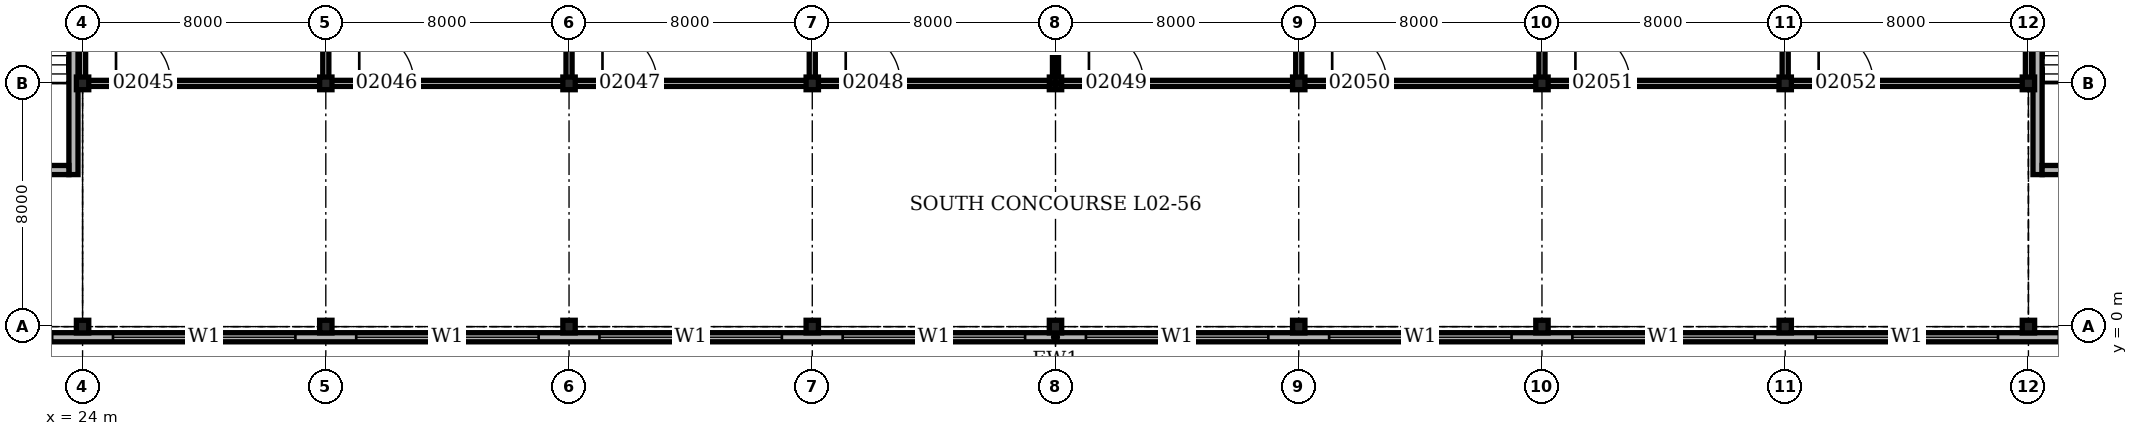
"""IFC4 building model, lengths in metres.
Left out: names, types, materials, properties, quantities, classifications, styles, units other than length and angle.
Written with IfcOpenShell. Run it as: python <this file> out.ifc"""

import sys

from ifc_helpers import new_model, si_unit, direction, frame, frame_2d, origin, origin_2d, place, context, subcontext, project, spatial, rectangle, i_section, extrude, element, fill, save


model = new_model("IFC4")
c1 = context("Model", 3, precision=1e-05, world=origin(), true_north=direction((0.0, 1.0)))
c2 = subcontext(c1, "Body", "Model", "MODEL_VIEW")
j1 = project(units=[si_unit("LENGTHUNIT", "METRE"), si_unit("PLANEANGLEUNIT", "RADIAN")], contexts=[c1])
p1 = place(None, origin())
s1 = spatial("IfcSite", under=j1, at=p1, CompositionType="ELEMENT")
p2 = place(p1, origin())
s2 = spatial("IfcBuilding", under=s1, at=p2, CompositionType="ELEMENT")
p3 = place(p2, frame((0.0, 0.0, 9.9)))
s3 = spatial("IfcBuildingStorey", under=s2, at=p3, CompositionType="ELEMENT", Elevation=9.9)
for number, where, z_axis, x_axis in (
    (1, (24.0, 0.0, 0.0), (0.0, 0.0, 1.0), (1.0, 0.0, 0.0)),
    (2, (24.0, 8.0, 0.0), (0.0, 0.0, 1.0), (1.0, 0.0, 0.0)),
    (3, (32.0, 0.0, 0.0), (0.0, 0.0, 1.0), (1.0, 0.0, 0.0)),
    (4, (32.0, 8.0, 0.0), (0.0, 0.0, 1.0), (1.0, 0.0, 0.0)),
    (5, (40.0, 0.0, 0.0), (0.0, 0.0, 1.0), (1.0, 0.0, 0.0)),
    (6, (40.0, 8.0, 0.0), (0.0, 0.0, 1.0), (1.0, 0.0, 0.0)),
    (7, (48.0, 0.0, 0.0), (0.0, 0.0, 1.0), (1.0, 0.0, 0.0)),
    (8, (48.0, 8.0, 0.0), (0.0, 0.0, 1.0), (1.0, 0.0, 0.0)),
    (9, (56.0, 0.0, 0.0), (0.0, 0.0, 1.0), (1.0, 0.0, 0.0)),
    (10, (56.0, 8.0, 0.0), (0.0, 0.0, 1.0), (1.0, 0.0, 0.0)),
    (11, (64.0, 0.0, 0.0), (0.0, 0.0, 1.0), (1.0, 0.0, 0.0)),
    (12, (64.0, 8.0, 0.0), (0.0, 0.0, 1.0), (1.0, 0.0, 0.0)),
    (13, (72.0, 0.0, 0.0), (0.0, 0.0, 1.0), (1.0, 0.0, 0.0)),
    (14, (72.0, 8.0, 0.0), (0.0, 0.0, 1.0), (1.0, 0.0, 0.0)),
    (15, (80.0, 0.0, 0.0), (0.0, 0.0, 1.0), (1.0, 0.0, 0.0)),
    (16, (80.0, 8.0, 0.0), (0.0, 0.0, 1.0), (1.0, 0.0, 0.0)),
    (17, (88.0, 0.0, 0.0), (0.0, 0.0, 1.0), (1.0, 0.0, 0.0)),
    (18, (88.0, 8.0, 0.0), (0.0, 0.0, 1.0), (1.0, 0.0, 0.0)),
):
    element("IfcColumn", number, at=place(p3, frame(where, z_axis=z_axis, x_axis=x_axis)), inside=s3, PredefinedType="COLUMN", context=c2, shape_type="SweptSolid", body=[
        extrude(i_section(OverallWidth=0.406, OverallDepth=0.417, WebThickness=0.03, FlangeThickness=0.048, at=origin_2d()), origin(), (0.0, 0.0, 1.0), 5.0),
    ])
p4 = place(p3, frame((-0.35, -0.35, 0.0), z_axis=(0.0, 0.0, 1.0), x_axis=(1.0, 0.0, 0.0)))
e19 = element("IfcWall", 19, at=p4, inside=s3, PredefinedType="SOLIDWALL", context=c2, shape_type="SweptSolid", body=[
    extrude(rectangle(XDim=112.7, YDim=0.3, at=frame_2d((56.35, 0.0))), origin(), (0.0, 0.0, 1.0), 5.0),
])
p5 = place(p4, frame((1.35, 0.0, 1.0)))
e20 = element("IfcOpeningElement", 20, at=p5, cuts=e19, PredefinedType="OPENING", context=c2, shape_type="SweptSolid", body=[
    extrude(rectangle(XDim=6.0, YDim=1.5, at=frame_2d((3.0, 0.75))), frame((0.0, 0.16, 0.0), z_axis=(0.0, -1.0, 0.0), x_axis=(1.0, 0.0, 0.0)), (0.0, 0.0, 1.0), 0.32),
])
p6 = place(p4, frame((9.35, 0.0, 1.0)))
e21 = element("IfcOpeningElement", 21, at=p6, cuts=e19, PredefinedType="OPENING", context=c2, shape_type="SweptSolid", body=[
    extrude(rectangle(XDim=6.0, YDim=1.5, at=frame_2d((3.0, 0.75))), frame((0.0, 0.16, 0.0), z_axis=(0.0, -1.0, 0.0), x_axis=(1.0, 0.0, 0.0)), (0.0, 0.0, 1.0), 0.32),
])
p7 = place(p4, frame((17.35, 0.0, 1.0)))
e22 = element("IfcOpeningElement", 22, at=p7, cuts=e19, PredefinedType="OPENING", context=c2, shape_type="SweptSolid", body=[
    extrude(rectangle(XDim=6.0, YDim=1.5, at=frame_2d((3.0, 0.75))), frame((0.0, 0.16, 0.0), z_axis=(0.0, -1.0, 0.0), x_axis=(1.0, 0.0, 0.0)), (0.0, 0.0, 1.0), 0.32),
])
p8 = place(p4, frame((25.35, 0.0, 1.0)))
e23 = element("IfcOpeningElement", 23, at=p8, cuts=e19, PredefinedType="OPENING", context=c2, shape_type="SweptSolid", body=[
    extrude(rectangle(XDim=6.0, YDim=1.5, at=frame_2d((3.0, 0.75))), frame((0.0, 0.16, 0.0), z_axis=(0.0, -1.0, 0.0), x_axis=(1.0, 0.0, 0.0)), (0.0, 0.0, 1.0), 0.32),
])
p9 = place(p4, frame((33.35, 0.0, 1.0)))
e24 = element("IfcOpeningElement", 24, at=p9, cuts=e19, PredefinedType="OPENING", context=c2, shape_type="SweptSolid", body=[
    extrude(rectangle(XDim=6.0, YDim=1.5, at=frame_2d((3.0, 0.75))), frame((0.0, 0.16, 0.0), z_axis=(0.0, -1.0, 0.0), x_axis=(1.0, 0.0, 0.0)), (0.0, 0.0, 1.0), 0.32),
])
p10 = place(p4, frame((41.35, 0.0, 1.0)))
e25 = element("IfcOpeningElement", 25, at=p10, cuts=e19, PredefinedType="OPENING", context=c2, shape_type="SweptSolid", body=[
    extrude(rectangle(XDim=6.0, YDim=1.5, at=frame_2d((3.0, 0.75))), frame((0.0, 0.16, 0.0), z_axis=(0.0, -1.0, 0.0), x_axis=(1.0, 0.0, 0.0)), (0.0, 0.0, 1.0), 0.32),
])
p11 = place(p4, frame((49.35, 0.0, 1.0)))
e26 = element("IfcOpeningElement", 26, at=p11, cuts=e19, PredefinedType="OPENING", context=c2, shape_type="SweptSolid", body=[
    extrude(rectangle(XDim=6.0, YDim=1.5, at=frame_2d((3.0, 0.75))), frame((0.0, 0.16, 0.0), z_axis=(0.0, -1.0, 0.0), x_axis=(1.0, 0.0, 0.0)), (0.0, 0.0, 1.0), 0.32),
])
p12 = place(p4, frame((57.35, 0.0, 1.0)))
e27 = element("IfcOpeningElement", 27, at=p12, cuts=e19, PredefinedType="OPENING", context=c2, shape_type="SweptSolid", body=[
    extrude(rectangle(XDim=6.0, YDim=1.5, at=frame_2d((3.0, 0.75))), frame((0.0, 0.16, 0.0), z_axis=(0.0, -1.0, 0.0), x_axis=(1.0, 0.0, 0.0)), (0.0, 0.0, 1.0), 0.32),
])
p13 = place(p4, frame((65.35, 0.0, 1.0)))
e28 = element("IfcOpeningElement", 28, at=p13, cuts=e19, PredefinedType="OPENING", context=c2, shape_type="SweptSolid", body=[
    extrude(rectangle(XDim=6.0, YDim=1.5, at=frame_2d((3.0, 0.75))), frame((0.0, 0.16, 0.0), z_axis=(0.0, -1.0, 0.0), x_axis=(1.0, 0.0, 0.0)), (0.0, 0.0, 1.0), 0.32),
])
p14 = place(p4, frame((73.35, 0.0, 1.0)))
e29 = element("IfcOpeningElement", 29, at=p14, cuts=e19, PredefinedType="OPENING", context=c2, shape_type="SweptSolid", body=[
    extrude(rectangle(XDim=6.0, YDim=1.5, at=frame_2d((3.0, 0.75))), frame((0.0, 0.16, 0.0), z_axis=(0.0, -1.0, 0.0), x_axis=(1.0, 0.0, 0.0)), (0.0, 0.0, 1.0), 0.32),
])
p15 = place(p4, frame((81.35, 0.0, 1.0)))
e30 = element("IfcOpeningElement", 30, at=p15, cuts=e19, PredefinedType="OPENING", context=c2, shape_type="SweptSolid", body=[
    extrude(rectangle(XDim=6.0, YDim=1.5, at=frame_2d((3.0, 0.75))), frame((0.0, 0.16, 0.0), z_axis=(0.0, -1.0, 0.0), x_axis=(1.0, 0.0, 0.0)), (0.0, 0.0, 1.0), 0.32),
])
p16 = place(p4, frame((89.35, 0.0, 1.0)))
e31 = element("IfcOpeningElement", 31, at=p16, cuts=e19, PredefinedType="OPENING", context=c2, shape_type="SweptSolid", body=[
    extrude(rectangle(XDim=6.0, YDim=1.5, at=frame_2d((3.0, 0.75))), frame((0.0, 0.16, 0.0), z_axis=(0.0, -1.0, 0.0), x_axis=(1.0, 0.0, 0.0)), (0.0, 0.0, 1.0), 0.32),
])
p17 = place(p4, frame((97.35, 0.0, 1.0)))
e32 = element("IfcOpeningElement", 32, at=p17, cuts=e19, PredefinedType="OPENING", context=c2, shape_type="SweptSolid", body=[
    extrude(rectangle(XDim=6.0, YDim=1.5, at=frame_2d((3.0, 0.75))), frame((0.0, 0.16, 0.0), z_axis=(0.0, -1.0, 0.0), x_axis=(1.0, 0.0, 0.0)), (0.0, 0.0, 1.0), 0.32),
])
p18 = place(p4, frame((105.35, 0.0, 1.0)))
e33 = element("IfcOpeningElement", 33, at=p18, cuts=e19, PredefinedType="OPENING", context=c2, shape_type="SweptSolid", body=[
    extrude(rectangle(XDim=6.0, YDim=1.5, at=frame_2d((3.0, 0.75))), frame((0.0, 0.16, 0.0), z_axis=(0.0, -1.0, 0.0), x_axis=(1.0, 0.0, 0.0)), (0.0, 0.0, 1.0), 0.32),
])
p19 = place(p3, frame((23.7, 5.0, 0.0), z_axis=(0.0, 0.0, 1.0), x_axis=(0.0, 1.0, 0.0)))
e34 = element("IfcWall", 34, at=p19, inside=s3, PredefinedType="SOLIDWALL", context=c2, shape_type="SweptSolid", body=[
    extrude(rectangle(XDim=10.85, YDim=0.3, at=frame_2d((5.425, 0.0))), origin(), (0.0, 0.0, 1.0), 4.8),
])
p20 = place(p3, frame((16.3, 5.15, 0.0), z_axis=(0.0, 0.0, 1.0), x_axis=(1.0, 0.0, 0.0)))
e35 = element("IfcWall", 35, at=p20, inside=s3, PredefinedType="SOLIDWALL", context=c2, shape_type="SweptSolid", body=[
    extrude(rectangle(XDim=7.25, YDim=0.3, at=frame_2d((3.625, 0.0))), origin(), (0.0, 0.0, 1.0), 4.8),
])
p21 = place(p20, frame((2.725, 0.0, 0.0)))
e36 = element("IfcOpeningElement", 36, at=p21, cuts=e35, PredefinedType="OPENING", context=c2, shape_type="SweptSolid", body=[
    extrude(rectangle(XDim=1.8, YDim=2.1, at=frame_2d((0.9, 1.05))), frame((0.0, 0.16, 0.0), z_axis=(0.0, -1.0, 0.0), x_axis=(1.0, 0.0, 0.0)), (0.0, 0.0, 1.0), 0.32),
])
p22 = place(p3, frame((88.3, 5.0, 0.0), z_axis=(0.0, 0.0, 1.0), x_axis=(0.0, 1.0, 0.0)))
e37 = element("IfcWall", 37, at=p22, inside=s3, PredefinedType="SOLIDWALL", context=c2, shape_type="SweptSolid", body=[
    extrude(rectangle(XDim=10.85, YDim=0.3, at=frame_2d((5.425, 0.0))), origin(), (0.0, 0.0, 1.0), 4.8),
])
p23 = place(p3, frame((88.45, 5.15, 0.0), z_axis=(0.0, 0.0, 1.0), x_axis=(1.0, 0.0, 0.0)))
e38 = element("IfcWall", 38, at=p23, inside=s3, PredefinedType="SOLIDWALL", context=c2, shape_type="SweptSolid", body=[
    extrude(rectangle(XDim=7.25, YDim=0.3, at=frame_2d((3.625, 0.0))), origin(), (0.0, 0.0, 1.0), 4.8),
])
p24 = place(p23, frame((2.725, 0.0, 0.0)))
e39 = element("IfcOpeningElement", 39, at=p24, cuts=e38, PredefinedType="OPENING", context=c2, shape_type="SweptSolid", body=[
    extrude(rectangle(XDim=1.8, YDim=2.1, at=frame_2d((0.9, 1.05))), frame((0.0, 0.16, 0.0), z_axis=(0.0, -1.0, 0.0), x_axis=(1.0, 0.0, 0.0)), (0.0, 0.0, 1.0), 0.32),
])
p25 = place(p3, frame((24.1, 8.0, 0.0), z_axis=(0.0, 0.0, 1.0), x_axis=(1.0, 0.0, 0.0)))
e40 = element("IfcWall", 40, at=p25, inside=s3, PredefinedType="PARTITIONING", context=c2, shape_type="SweptSolid", body=[
    extrude(rectangle(XDim=63.8, YDim=0.2, at=frame_2d((31.9, 0.0))), origin(), (0.0, 0.0, 1.0), 4.028),
])
p26 = place(p25, frame((1.0, 0.0, 0.0)))
e41 = element("IfcOpeningElement", 41, at=p26, cuts=e40, PredefinedType="OPENING", context=c2, shape_type="SweptSolid", body=[
    extrude(rectangle(XDim=1.8, YDim=2.4, at=frame_2d((0.9, 1.2))), frame((0.0, 0.11, 0.0), z_axis=(0.0, -1.0, 0.0), x_axis=(1.0, 0.0, 0.0)), (0.0, 0.0, 1.0), 0.22),
])
p27 = place(p25, frame((9.0, 0.0, 0.0)))
e42 = element("IfcOpeningElement", 42, at=p27, cuts=e40, PredefinedType="OPENING", context=c2, shape_type="SweptSolid", body=[
    extrude(rectangle(XDim=1.8, YDim=2.4, at=frame_2d((0.9, 1.2))), frame((0.0, 0.11, 0.0), z_axis=(0.0, -1.0, 0.0), x_axis=(1.0, 0.0, 0.0)), (0.0, 0.0, 1.0), 0.22),
])
p28 = place(p25, frame((17.0, 0.0, 0.0)))
e43 = element("IfcOpeningElement", 43, at=p28, cuts=e40, PredefinedType="OPENING", context=c2, shape_type="SweptSolid", body=[
    extrude(rectangle(XDim=1.8, YDim=2.4, at=frame_2d((0.9, 1.2))), frame((0.0, 0.11, 0.0), z_axis=(0.0, -1.0, 0.0), x_axis=(1.0, 0.0, 0.0)), (0.0, 0.0, 1.0), 0.22),
])
p29 = place(p25, frame((25.0, 0.0, 0.0)))
e44 = element("IfcOpeningElement", 44, at=p29, cuts=e40, PredefinedType="OPENING", context=c2, shape_type="SweptSolid", body=[
    extrude(rectangle(XDim=1.8, YDim=2.4, at=frame_2d((0.9, 1.2))), frame((0.0, 0.11, 0.0), z_axis=(0.0, -1.0, 0.0), x_axis=(1.0, 0.0, 0.0)), (0.0, 0.0, 1.0), 0.22),
])
p30 = place(p25, frame((33.0, 0.0, 0.0)))
e45 = element("IfcOpeningElement", 45, at=p30, cuts=e40, PredefinedType="OPENING", context=c2, shape_type="SweptSolid", body=[
    extrude(rectangle(XDim=1.8, YDim=2.4, at=frame_2d((0.9, 1.2))), frame((0.0, 0.11, 0.0), z_axis=(0.0, -1.0, 0.0), x_axis=(1.0, 0.0, 0.0)), (0.0, 0.0, 1.0), 0.22),
])
p31 = place(p25, frame((41.0, 0.0, 0.0)))
e46 = element("IfcOpeningElement", 46, at=p31, cuts=e40, PredefinedType="OPENING", context=c2, shape_type="SweptSolid", body=[
    extrude(rectangle(XDim=1.8, YDim=2.4, at=frame_2d((0.9, 1.2))), frame((0.0, 0.11, 0.0), z_axis=(0.0, -1.0, 0.0), x_axis=(1.0, 0.0, 0.0)), (0.0, 0.0, 1.0), 0.22),
])
p32 = place(p25, frame((49.0, 0.0, 0.0)))
e47 = element("IfcOpeningElement", 47, at=p32, cuts=e40, PredefinedType="OPENING", context=c2, shape_type="SweptSolid", body=[
    extrude(rectangle(XDim=1.8, YDim=2.4, at=frame_2d((0.9, 1.2))), frame((0.0, 0.11, 0.0), z_axis=(0.0, -1.0, 0.0), x_axis=(1.0, 0.0, 0.0)), (0.0, 0.0, 1.0), 0.22),
])
p33 = place(p25, frame((57.0, 0.0, 0.0)))
e48 = element("IfcOpeningElement", 48, at=p33, cuts=e40, PredefinedType="OPENING", context=c2, shape_type="SweptSolid", body=[
    extrude(rectangle(XDim=1.8, YDim=2.4, at=frame_2d((0.9, 1.2))), frame((0.0, 0.11, 0.0), z_axis=(0.0, -1.0, 0.0), x_axis=(1.0, 0.0, 0.0)), (0.0, 0.0, 1.0), 0.22),
])
p34 = place(p3, frame((24.0, 8.1, 0.0), z_axis=(0.0, 0.0, 1.0), x_axis=(0.0, 1.0, 0.0)))
e49 = element("IfcWall", 49, at=p34, inside=s3, PredefinedType="PARTITIONING", context=c2, shape_type="SweptSolid", body=[
    extrude(rectangle(XDim=55.8, YDim=0.2, at=frame_2d((27.9, 0.0))), origin(), (0.0, 0.0, 1.0), 4.028),
])
for number, where, z_axis, x_axis in (
    (50, (32.0, 8.1, 0.0), (0.0, 0.0, 1.0), (0.0, 1.0, 0.0)),
    (51, (40.0, 8.1, 0.0), (0.0, 0.0, 1.0), (0.0, 1.0, 0.0)),
    (52, (48.0, 8.1, 0.0), (0.0, 0.0, 1.0), (0.0, 1.0, 0.0)),
    (53, (56.0, 8.1, 0.0), (0.0, 0.0, 1.0), (0.0, 1.0, 0.0)),
    (54, (64.0, 8.1, 0.0), (0.0, 0.0, 1.0), (0.0, 1.0, 0.0)),
    (55, (72.0, 8.1, 0.0), (0.0, 0.0, 1.0), (0.0, 1.0, 0.0)),
    (56, (80.0, 8.1, 0.0), (0.0, 0.0, 1.0), (0.0, 1.0, 0.0)),
):
    element("IfcWall", number, at=place(p3, frame(where, z_axis=z_axis, x_axis=x_axis)), inside=s3, PredefinedType="PARTITIONING", context=c2, shape_type="SweptSolid", body=[
        extrude(rectangle(XDim=7.8, YDim=0.2, at=frame_2d((3.9, 0.0))), origin(), (0.0, 0.0, 1.0), 4.072),
    ])
p35 = place(p3, frame((88.0, 8.1, 0.0), z_axis=(0.0, 0.0, 1.0), x_axis=(0.0, 1.0, 0.0)))
e57 = element("IfcWall", 57, at=p35, inside=s3, PredefinedType="PARTITIONING", context=c2, shape_type="SweptSolid", body=[
    extrude(rectangle(XDim=55.8, YDim=0.2, at=frame_2d((27.9, 0.0))), origin(), (0.0, 0.0, 1.0), 4.028),
])
p36 = place(p8, origin())
e58 = element("IfcWindow", 58, at=p36, inside=s3, PartitioningType="SINGLE_PANEL", PredefinedType="WINDOW", context=c2, shape_type="SweptSolid", body=[
    extrude(rectangle(XDim=6.0, YDim=1.5, at=frame_2d((3.0, 0.75))), frame((0.0, 0.03, 0.0), z_axis=(0.0, -1.0, 0.0), x_axis=(1.0, 0.0, 0.0)), (0.0, 0.0, 1.0), 0.06),
])
fill(e23, e58)
p37 = place(p9, origin())
e59 = element("IfcWindow", 59, at=p37, inside=s3, PartitioningType="SINGLE_PANEL", PredefinedType="WINDOW", context=c2, shape_type="SweptSolid", body=[
    extrude(rectangle(XDim=6.0, YDim=1.5, at=frame_2d((3.0, 0.75))), frame((0.0, 0.03, 0.0), z_axis=(0.0, -1.0, 0.0), x_axis=(1.0, 0.0, 0.0)), (0.0, 0.0, 1.0), 0.06),
])
fill(e24, e59)
p38 = place(p10, origin())
e60 = element("IfcWindow", 60, at=p38, inside=s3, PartitioningType="SINGLE_PANEL", PredefinedType="WINDOW", context=c2, shape_type="SweptSolid", body=[
    extrude(rectangle(XDim=6.0, YDim=1.5, at=frame_2d((3.0, 0.75))), frame((0.0, 0.03, 0.0), z_axis=(0.0, -1.0, 0.0), x_axis=(1.0, 0.0, 0.0)), (0.0, 0.0, 1.0), 0.06),
])
fill(e25, e60)
p39 = place(p11, origin())
e61 = element("IfcWindow", 61, at=p39, inside=s3, PartitioningType="SINGLE_PANEL", PredefinedType="WINDOW", context=c2, shape_type="SweptSolid", body=[
    extrude(rectangle(XDim=6.0, YDim=1.5, at=frame_2d((3.0, 0.75))), frame((0.0, 0.03, 0.0), z_axis=(0.0, -1.0, 0.0), x_axis=(1.0, 0.0, 0.0)), (0.0, 0.0, 1.0), 0.06),
])
fill(e26, e61)
p40 = place(p12, origin())
e62 = element("IfcWindow", 62, at=p40, inside=s3, PartitioningType="SINGLE_PANEL", PredefinedType="WINDOW", context=c2, shape_type="SweptSolid", body=[
    extrude(rectangle(XDim=6.0, YDim=1.5, at=frame_2d((3.0, 0.75))), frame((0.0, 0.03, 0.0), z_axis=(0.0, -1.0, 0.0), x_axis=(1.0, 0.0, 0.0)), (0.0, 0.0, 1.0), 0.06),
])
fill(e27, e62)
p41 = place(p13, origin())
e63 = element("IfcWindow", 63, at=p41, inside=s3, PartitioningType="SINGLE_PANEL", PredefinedType="WINDOW", context=c2, shape_type="SweptSolid", body=[
    extrude(rectangle(XDim=6.0, YDim=1.5, at=frame_2d((3.0, 0.75))), frame((0.0, 0.03, 0.0), z_axis=(0.0, -1.0, 0.0), x_axis=(1.0, 0.0, 0.0)), (0.0, 0.0, 1.0), 0.06),
])
fill(e28, e63)
p42 = place(p14, origin())
e64 = element("IfcWindow", 64, at=p42, inside=s3, PartitioningType="SINGLE_PANEL", PredefinedType="WINDOW", context=c2, shape_type="SweptSolid", body=[
    extrude(rectangle(XDim=6.0, YDim=1.5, at=frame_2d((3.0, 0.75))), frame((0.0, 0.03, 0.0), z_axis=(0.0, -1.0, 0.0), x_axis=(1.0, 0.0, 0.0)), (0.0, 0.0, 1.0), 0.06),
])
fill(e29, e64)
p43 = place(p15, origin())
e65 = element("IfcWindow", 65, at=p43, inside=s3, PartitioningType="SINGLE_PANEL", PredefinedType="WINDOW", context=c2, shape_type="SweptSolid", body=[
    extrude(rectangle(XDim=6.0, YDim=1.5, at=frame_2d((3.0, 0.75))), frame((0.0, 0.03, 0.0), z_axis=(0.0, -1.0, 0.0), x_axis=(1.0, 0.0, 0.0)), (0.0, 0.0, 1.0), 0.06),
])
fill(e30, e65)
p44 = place(p26, origin())
e66 = element("IfcDoor", 66, at=p44, inside=s3, OperationType="DOUBLE_DOOR_DOUBLE_SWING", PredefinedType="DOOR", context=c2, shape_type="SweptSolid", body=[
    extrude(rectangle(XDim=1.8, YDim=2.4, at=frame_2d((0.9, 1.2))), frame((0.0, 0.1, 0.0), z_axis=(0.0, -1.0, 0.0), x_axis=(1.0, 0.0, 0.0)), (0.0, 0.0, 1.0), 0.199),
])
fill(e41, e66)
p45 = place(p27, origin())
e67 = element("IfcDoor", 67, at=p45, inside=s3, OperationType="DOUBLE_DOOR_DOUBLE_SWING", PredefinedType="DOOR", context=c2, shape_type="SweptSolid", body=[
    extrude(rectangle(XDim=1.8, YDim=2.4, at=frame_2d((0.9, 1.2))), frame((0.0, 0.1, 0.0), z_axis=(0.0, -1.0, 0.0), x_axis=(1.0, 0.0, 0.0)), (0.0, 0.0, 1.0), 0.199),
])
fill(e42, e67)
p46 = place(p28, origin())
e68 = element("IfcDoor", 68, at=p46, inside=s3, OperationType="DOUBLE_DOOR_DOUBLE_SWING", PredefinedType="DOOR", context=c2, shape_type="SweptSolid", body=[
    extrude(rectangle(XDim=1.8, YDim=2.4, at=frame_2d((0.9, 1.2))), frame((0.0, 0.1, 0.0), z_axis=(0.0, -1.0, 0.0), x_axis=(1.0, 0.0, 0.0)), (0.0, 0.0, 1.0), 0.199),
])
fill(e43, e68)
p47 = place(p29, origin())
e69 = element("IfcDoor", 69, at=p47, inside=s3, OperationType="DOUBLE_DOOR_DOUBLE_SWING", PredefinedType="DOOR", context=c2, shape_type="SweptSolid", body=[
    extrude(rectangle(XDim=1.8, YDim=2.4, at=frame_2d((0.9, 1.2))), frame((0.0, 0.1, 0.0), z_axis=(0.0, -1.0, 0.0), x_axis=(1.0, 0.0, 0.0)), (0.0, 0.0, 1.0), 0.199),
])
fill(e44, e69)
p48 = place(p30, origin())
e70 = element("IfcDoor", 70, at=p48, inside=s3, OperationType="DOUBLE_DOOR_DOUBLE_SWING", PredefinedType="DOOR", context=c2, shape_type="SweptSolid", body=[
    extrude(rectangle(XDim=1.8, YDim=2.4, at=frame_2d((0.9, 1.2))), frame((0.0, 0.1, 0.0), z_axis=(0.0, -1.0, 0.0), x_axis=(1.0, 0.0, 0.0)), (0.0, 0.0, 1.0), 0.199),
])
fill(e45, e70)
p49 = place(p31, origin())
e71 = element("IfcDoor", 71, at=p49, inside=s3, OperationType="DOUBLE_DOOR_DOUBLE_SWING", PredefinedType="DOOR", context=c2, shape_type="SweptSolid", body=[
    extrude(rectangle(XDim=1.8, YDim=2.4, at=frame_2d((0.9, 1.2))), frame((0.0, 0.1, 0.0), z_axis=(0.0, -1.0, 0.0), x_axis=(1.0, 0.0, 0.0)), (0.0, 0.0, 1.0), 0.199),
])
fill(e46, e71)
p50 = place(p32, origin())
e72 = element("IfcDoor", 72, at=p50, inside=s3, OperationType="DOUBLE_DOOR_DOUBLE_SWING", PredefinedType="DOOR", context=c2, shape_type="SweptSolid", body=[
    extrude(rectangle(XDim=1.8, YDim=2.4, at=frame_2d((0.9, 1.2))), frame((0.0, 0.1, 0.0), z_axis=(0.0, -1.0, 0.0), x_axis=(1.0, 0.0, 0.0)), (0.0, 0.0, 1.0), 0.199),
])
fill(e47, e72)
p51 = place(p33, origin())
e73 = element("IfcDoor", 73, at=p51, inside=s3, OperationType="DOUBLE_DOOR_DOUBLE_SWING", PredefinedType="DOOR", context=c2, shape_type="SweptSolid", body=[
    extrude(rectangle(XDim=1.8, YDim=2.4, at=frame_2d((0.9, 1.2))), frame((0.0, 0.1, 0.0), z_axis=(0.0, -1.0, 0.0), x_axis=(1.0, 0.0, 0.0)), (0.0, 0.0, 1.0), 0.199),
])
fill(e48, e73)
save(model, sys.argv[1])
